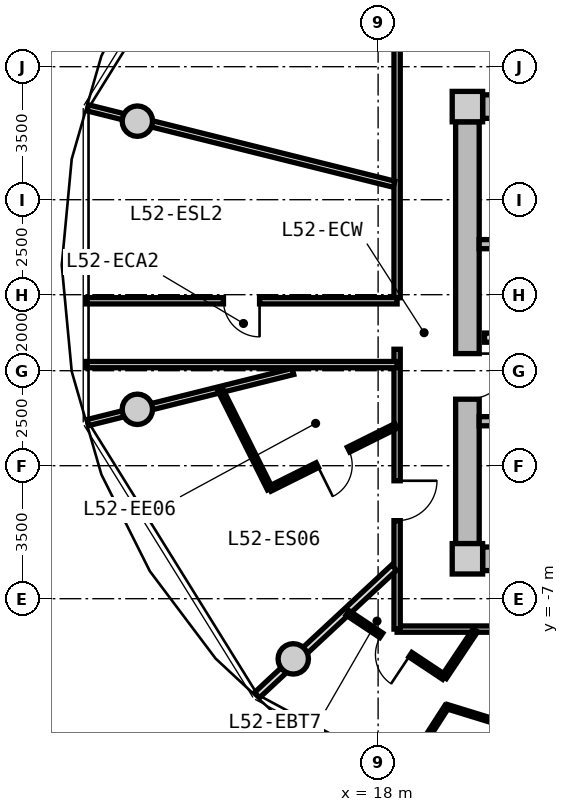
"""IFC4 building model, lengths in metres.
Left out: names, types, materials, properties, quantities, classifications, styles, units other than length and angle.
Written with IfcOpenShell. Run it as: python <this file> out.ifc"""

import sys

from ifc_helpers import new_model, si_unit, direction, frame, frame_2d, origin, origin_2d, place, context, subcontext, project, spatial, rectangle, circle, extrude, source, transform, mapped, element, fill, save


model = new_model("IFC4")
c1 = context("Model", 3, precision=1e-05, world=origin(), true_north=direction((0.0, 1.0)))
c2 = subcontext(c1, "Body", "Model", "MODEL_VIEW")
j1 = project(units=[si_unit("LENGTHUNIT", "METRE"), si_unit("PLANEANGLEUNIT", "RADIAN")], contexts=[c1])
p1 = place(None, origin())
s1 = spatial("IfcSite", under=j1, at=p1, CompositionType="ELEMENT")
p2 = place(p1, origin())
s2 = spatial("IfcBuilding", under=s1, at=p2, CompositionType="ELEMENT")
p3 = place(p2, frame((0.0, 0.0, 167.85)))
s3 = spatial("IfcBuildingStorey", under=s2, at=p3, CompositionType="ELEMENT", Elevation=167.85)
m1 = source(origin(), c2, "Body", "SweptSolid", [
    extrude(rectangle(XDim=0.8, YDim=0.8, at=origin_2d()), origin(), (0.0, 0.0, 1.0), 3.05),
])
for number, where, z_axis, x_axis in (
    (1, (20.35, -5.95, 0.0), (0.0, 0.0, 1.0), (1.0, 0.0, 0.0)),
    (2, (20.35, 5.95, 0.0), (0.0, 0.0, 1.0), (1.0, 0.0, 0.0)),
):
    element("IfcColumn", number, at=place(p3, frame(where, z_axis=z_axis, x_axis=x_axis)), inside=s3, PredefinedType="COLUMN", context=c2, shape_type="MappedRepresentation", body=[
        mapped(m1, transform((0.0, 0.0, 0.0), x_axis=(1.0, 0.0, 0.0), y_axis=(0.0, 1.0, 0.0), z_axis=(0.0, 0.0, 1.0), scale=1.0)),
    ])
m2 = source(origin(), c2, "Body", "SweptSolid", [
    extrude(rectangle(XDim=14.5, YDim=0.62, at=frame_2d((7.25, 0.0))), origin(), (0.0, 0.0, 1.0), 2.81),
])
for number, where, z_axis, x_axis in (
    (3, (20.75, 5.95, 0.0), (0.0, 0.0, 1.0), (1.0, 0.0, 0.0)),
    (4, (35.25, -5.95, 0.0), (0.0, 0.0, 1.0), (-1.0, 0.0, 0.0)),
):
    element("IfcWall", number, at=place(p3, frame(where, z_axis=z_axis, x_axis=x_axis)), inside=s3, PredefinedType="SHEAR", context=c2, shape_type="MappedRepresentation", body=[
        mapped(m2, transform((0.0, 0.0, 0.0), x_axis=(1.0, 0.0, 0.0), y_axis=(0.0, 1.0, 0.0), z_axis=(0.0, 0.0, 1.0), scale=1.0)),
    ])
m3 = source(origin(), c2, "Body", "SweptSolid", [
    extrude(rectangle(XDim=11.1, YDim=0.62, at=frame_2d((5.55, 0.0))), origin(), (0.0, 0.0, 1.0), 2.81),
])
p4 = place(p3, frame((20.35, -5.55, 0.0), z_axis=(0.0, 0.0, 1.0), x_axis=(0.0, 1.0, 0.0)))
e5 = element("IfcWall", 5, at=p4, inside=s3, PredefinedType="SHEAR", context=c2, shape_type="MappedRepresentation", body=[
    mapped(m3, transform((0.0, 0.0, 0.0), x_axis=(1.0, 0.0, 0.0), y_axis=(0.0, 1.0, 0.0), z_axis=(0.0, 0.0, 1.0), scale=1.0)),
])
p5 = place(p4, frame((3.8, 0.0, 0.0)))
e6 = element("IfcOpeningElement", 6, at=p5, cuts=e5, PredefinedType="OPENING", context=c2, shape_type="SweptSolid", body=[
    extrude(rectangle(XDim=1.2, YDim=2.15, at=frame_2d((0.6, 1.075))), frame((0.0, 0.32, 0.0), z_axis=(0.0, -1.0, 0.0), x_axis=(1.0, 0.0, 0.0)), (0.0, 0.0, 1.0), 0.64),
])
m4 = source(origin(), c2, "Body", "SweptSolid", [
    extrude(circle(Radius=0.4, at=origin_2d()), origin(), (0.0, 0.0, 1.0), 3.05),
])
for number, where, z_axis, x_axis in (
    (7, (11.665, 5.567, 0.0), (0.0, 0.0, 1.0), (1.0, 0.0, 0.0)),
    (8, (11.665, -2.016, 0.0), (0.0, 0.0, 1.0), (1.0, 0.0, 0.0)),
    (9, (15.767, -8.584, 0.0), (0.0, 0.0, 1.0), (1.0, 0.0, 0.0)),
):
    element("IfcColumn", number, at=place(p3, frame(where, z_axis=z_axis, x_axis=x_axis)), inside=s3, PredefinedType="COLUMN", context=c2, shape_type="MappedRepresentation", body=[
        mapped(m4, transform((0.0, 0.0, 0.0), x_axis=(1.0, 0.0, 0.0), y_axis=(0.0, 1.0, 0.0), z_axis=(0.0, 0.0, 1.0), scale=1.0)),
    ])
m5 = source(origin(), c2, "Body", "SweptSolid", [
    extrude(rectangle(XDim=7.88, YDim=0.24, at=frame_2d((3.94, 0.0))), origin(), (0.0, 0.0, 1.0), 2.81),
])
p6 = place(p3, frame((20.66, 2.33, 0.0), z_axis=(0.0, 0.0, 1.0), x_axis=(1.0, 0.0, 0.0)))
e10 = element("IfcWall", 10, at=p6, inside=s3, PredefinedType="PARTITIONING", context=c2, shape_type="MappedRepresentation", body=[
    mapped(m5, transform((0.0, 0.0, 0.0), x_axis=(1.0, 0.0, 0.0), y_axis=(0.0, 1.0, 0.0), z_axis=(0.0, 0.0, 1.0), scale=1.0)),
])
p7 = place(p3, frame((20.66, -2.33, 0.0), z_axis=(0.0, 0.0, 1.0), x_axis=(1.0, 0.0, 0.0)))
e11 = element("IfcWall", 11, at=p7, inside=s3, PredefinedType="PARTITIONING", context=c2, shape_type="MappedRepresentation", body=[
    mapped(m5, transform((0.0, 0.0, 0.0), x_axis=(1.0, 0.0, 0.0), y_axis=(0.0, 1.0, 0.0), z_axis=(0.0, 0.0, 1.0), scale=1.0)),
])
p8 = place(p7, frame((1.0, 0.0, 0.0)))
e12 = element("IfcOpeningElement", 12, at=p8, cuts=e11, PredefinedType="OPENING", context=c2, shape_type="SweptSolid", body=[
    extrude(rectangle(XDim=1.1, YDim=2.15, at=frame_2d((0.55, 1.075))), frame((0.0, 0.13, 0.0), z_axis=(0.0, -1.0, 0.0), x_axis=(1.0, 0.0, 0.0)), (0.0, 0.0, 1.0), 0.26),
])
m6 = source(origin(), c2, "Body", "SweptSolid", [
    extrude(rectangle(XDim=7.62, YDim=0.24, at=frame_2d((3.81, 0.0))), origin(), (0.0, 0.0, 1.0), 2.795),
])
p9 = place(p3, frame((20.8, -0.13, 0.0), z_axis=(0.0, 0.0, 1.0), x_axis=(1.0, 0.0, 0.0)))
e13 = element("IfcWall", 13, at=p9, inside=s3, PredefinedType="PARTITIONING", context=c2, shape_type="MappedRepresentation", body=[
    mapped(m6, transform((0.0, 0.0, 0.0), x_axis=(1.0, 0.0, 0.0), y_axis=(0.0, 1.0, 0.0), z_axis=(0.0, 0.0, 1.0), scale=1.0)),
])
p10 = place(p9, frame((6.22, 0.0, 0.0)))
e14 = element("IfcOpeningElement", 14, at=p10, cuts=e13, PredefinedType="OPENING", context=c2, shape_type="SweptSolid", body=[
    extrude(rectangle(XDim=1.0, YDim=2.1, at=frame_2d((0.5, 1.05))), frame((0.0, 0.13, 0.0), z_axis=(0.0, -1.0, 0.0), x_axis=(1.0, 0.0, 0.0)), (0.0, 0.0, 1.0), 0.26),
])
p11 = place(p9, frame((2.4, 0.0, 0.0)))
e15 = element("IfcOpeningElement", 15, at=p11, cuts=e13, PredefinedType="OPENING", context=c2, shape_type="SweptSolid", body=[
    extrude(rectangle(XDim=1.0, YDim=2.1, at=frame_2d((0.5, 1.05))), frame((0.0, 0.13, 0.0), z_axis=(0.0, -1.0, 0.0), x_axis=(1.0, 0.0, 0.0)), (0.0, 0.0, 1.0), 0.26),
])
m7 = source(origin(), c2, "Body", "SweptSolid", [
    extrude(rectangle(XDim=19.0, YDim=0.165, at=frame_2d((9.5, 0.0))), origin(), (0.0, 0.0, 1.0), 2.795),
])
p12 = place(p3, frame((37.5, -7.8, 0.0), z_axis=(0.0, 0.0, 1.0), x_axis=(-1.0, 0.0, 0.0)))
e16 = element("IfcWall", 16, at=p12, inside=s3, PredefinedType="PARTITIONING", context=c2, shape_type="MappedRepresentation", body=[
    mapped(m7, transform((0.0, 0.0, 0.0), x_axis=(1.0, 0.0, 0.0), y_axis=(0.0, 1.0, 0.0), z_axis=(0.0, 0.0, 1.0), scale=1.0)),
])
p13 = place(p12, frame((8.061, 0.0, 0.0)))
e17 = element("IfcOpeningElement", 17, at=p13, cuts=e16, PredefinedType="OPENING", context=c2, shape_type="SweptSolid", body=[
    extrude(rectangle(XDim=1.05, YDim=2.15, at=frame_2d((0.525, 1.075))), frame((0.0, 0.093, 0.0), z_axis=(0.0, -1.0, 0.0), x_axis=(1.0, 0.0, 0.0)), (0.0, 0.0, 1.0), 0.185),
])
m8 = source(origin(), c2, "Body", "SweptSolid", [
    extrude(rectangle(XDim=7.365, YDim=0.165, at=frame_2d((3.682, 0.0))), origin(), (0.0, 0.0, 1.0), 2.795),
])
p14 = place(p3, frame((18.5, -7.8, 0.0), z_axis=(0.0, 0.0, 1.0), x_axis=(0.0, 1.0, 0.0)))
e18 = element("IfcWall", 18, at=p14, inside=s3, PredefinedType="PARTITIONING", context=c2, shape_type="MappedRepresentation", body=[
    mapped(m8, transform((0.0, 0.0, 0.0), x_axis=(1.0, 0.0, 0.0), y_axis=(0.0, 1.0, 0.0), z_axis=(0.0, 0.0, 1.0), scale=1.0)),
])
p15 = place(p14, frame((2.854, 0.0, 0.0)))
e19 = element("IfcOpeningElement", 19, at=p15, cuts=e18, PredefinedType="OPENING", context=c2, shape_type="SweptSolid", body=[
    extrude(rectangle(XDim=1.05, YDim=2.15, at=frame_2d((0.525, 1.075))), frame((0.0, 0.093, 0.0), z_axis=(0.0, -1.0, 0.0), x_axis=(1.0, 0.0, 0.0)), (0.0, 0.0, 1.0), 0.185),
])
m9 = source(origin(), c2, "Body", "SweptSolid", [
    extrude(rectangle(XDim=6.88, YDim=0.165, at=frame_2d((3.44, 0.0))), origin(), (0.0, 0.0, 1.0), 2.795),
])
p16 = place(p3, frame((18.5, 0.92, 0.0), z_axis=(0.0, 0.0, 1.0), x_axis=(0.0, 1.0, 0.0)))
e20 = element("IfcWall", 20, at=p16, inside=s3, PredefinedType="PARTITIONING", context=c2, shape_type="MappedRepresentation", body=[
    mapped(m9, transform((0.0, 0.0, 0.0), x_axis=(1.0, 0.0, 0.0), y_axis=(0.0, 1.0, 0.0), z_axis=(0.0, 0.0, 1.0), scale=1.0)),
])
m10 = source(origin(), c2, "Body", "SweptSolid", [
    extrude(rectangle(XDim=8.305, YDim=0.165, at=frame_2d((4.153, 0.0))), origin(), (0.0, 0.0, 1.0), 2.345),
])
p17 = place(p3, frame((18.42, 3.908, 0.0), z_axis=(0.0, 0.0, 1.0), x_axis=(-0.970309994378, 0.241864662175, 0.0)))
e21 = element("IfcWall", 21, at=p17, inside=s3, PredefinedType="PARTITIONING", context=c2, shape_type="MappedRepresentation", body=[
    mapped(m10, transform((0.0, 0.0, 0.0), x_axis=(1.0, 0.0, 0.0), y_axis=(0.0, 1.0, 0.0), z_axis=(0.0, 0.0, 1.0), scale=1.0)),
])
m11 = source(origin(), c2, "Body", "SweptSolid", [
    extrude(rectangle(XDim=5.564, YDim=0.165, at=frame_2d((2.782, 0.0))), origin(), (0.0, 0.0, 1.0), 2.345),
])
p18 = place(p3, frame((15.76, -1.02, 0.0), z_axis=(0.0, 0.0, 1.0), x_axis=(-0.970315176167, -0.241843872984, 0.0)))
e22 = element("IfcWall", 22, at=p18, inside=s3, PredefinedType="PARTITIONING", context=c2, shape_type="MappedRepresentation", body=[
    mapped(m11, transform((0.0, 0.0, 0.0), x_axis=(1.0, 0.0, 0.0), y_axis=(0.0, 1.0, 0.0), z_axis=(0.0, 0.0, 1.0), scale=1.0)),
])
m12 = source(origin(), c2, "Body", "SweptSolid", [
    extrude(rectangle(XDim=8.189, YDim=0.165, at=frame_2d((4.094, 0.0))), origin(), (0.0, 0.0, 1.0), 2.795),
])
p19 = place(p3, frame((10.311, 0.84, 0.0), z_axis=(0.0, 0.0, 1.0), x_axis=(1.0, 0.0, 0.0)))
e23 = element("IfcWall", 23, at=p19, inside=s3, PredefinedType="PARTITIONING", context=c2, shape_type="MappedRepresentation", body=[
    mapped(m12, transform((0.0, 0.0, 0.0), x_axis=(1.0, 0.0, 0.0), y_axis=(0.0, 1.0, 0.0), z_axis=(0.0, 0.0, 1.0), scale=1.0)),
])
p20 = place(p19, frame((3.619, 0.0, 0.0)))
e24 = element("IfcOpeningElement", 24, at=p20, cuts=e23, PredefinedType="OPENING", context=c2, shape_type="SweptSolid", body=[
    extrude(rectangle(XDim=0.95, YDim=2.1, at=frame_2d((0.475, 1.05))), frame((0.0, 0.093, 0.0), z_axis=(0.0, -1.0, 0.0), x_axis=(1.0, 0.0, 0.0)), (0.0, 0.0, 1.0), 0.185),
])
p21 = place(p3, frame((18.5, -0.84, 0.0), z_axis=(0.0, 0.0, 1.0), x_axis=(-1.0, 0.0, 0.0)))
e25 = element("IfcWall", 25, at=p21, inside=s3, PredefinedType="PARTITIONING", context=c2, shape_type="MappedRepresentation", body=[
    mapped(m12, transform((0.0, 0.0, 0.0), x_axis=(1.0, 0.0, 0.0), y_axis=(0.0, 1.0, 0.0), z_axis=(0.0, 0.0, 1.0), scale=1.0)),
])
m13 = source(origin(), c2, "Body", "SweptSolid", [
    extrude(rectangle(XDim=4.927, YDim=0.19, at=frame_2d((2.463, 0.0))), origin(), (0.0, 0.0, 1.0), 2.345),
])
p22 = place(p3, frame((18.42, -6.183, 0.0), z_axis=(0.0, 0.0, 1.0), x_axis=(-0.732191335987, -0.681098999783, 0.0)))
e26 = element("IfcWall", 26, at=p22, inside=s3, PredefinedType="PARTITIONING", context=c2, shape_type="MappedRepresentation", body=[
    mapped(m13, transform((0.0, 0.0, 0.0), x_axis=(1.0, 0.0, 0.0), y_axis=(0.0, 1.0, 0.0), z_axis=(0.0, 0.0, 1.0), scale=1.0)),
])
m14 = source(origin(), c2, "Body", "SweptSolid", [
    extrude(rectangle(XDim=3.707, YDim=0.14, at=frame_2d((1.854, 0.0))), origin(), (0.0, 0.0, 1.0), 2.795),
])
p23 = place(p3, frame((18.47, -2.456, 0.0), z_axis=(0.0, 0.0, 1.0), x_axis=(-0.895347377717, -0.44536846904, 0.0)))
e27 = element("IfcWall", 27, at=p23, inside=s3, PredefinedType="PARTITIONING", context=c2, shape_type="MappedRepresentation", body=[
    mapped(m14, transform((0.0, 0.0, 0.0), x_axis=(1.0, 0.0, 0.0), y_axis=(0.0, 1.0, 0.0), z_axis=(0.0, 0.0, 1.0), scale=1.0)),
])
p24 = place(p23, frame((1.394, 0.0, 0.0)))
e28 = element("IfcOpeningElement", 28, at=p24, cuts=e27, PredefinedType="OPENING", context=c2, shape_type="SweptSolid", body=[
    extrude(rectangle(XDim=0.92, YDim=2.1, at=frame_2d((0.46, 1.05))), frame((0.0, 0.08, 0.0), z_axis=(0.0, -1.0, 0.0), x_axis=(1.0, 0.0, 0.0)), (0.0, 0.0, 1.0), 0.16),
])
m15 = source(origin(), c2, "Body", "SweptSolid", [
    extrude(rectangle(XDim=2.918, YDim=0.14, at=frame_2d((1.459, 0.0))), origin(), (0.0, 0.0, 1.0), 2.795),
])
p25 = place(p3, frame((15.151, -4.107, 0.0), z_axis=(0.0, 0.0, 1.0), x_axis=(-0.447146668647, 0.894460651296, 0.0)))
e29 = element("IfcWall", 29, at=p25, inside=s3, PredefinedType="PARTITIONING", context=c2, shape_type="MappedRepresentation", body=[
    mapped(m15, transform((0.0, 0.0, 0.0), x_axis=(1.0, 0.0, 0.0), y_axis=(0.0, 1.0, 0.0), z_axis=(0.0, 0.0, 1.0), scale=1.0)),
])
m16 = source(origin(), c2, "Body", "SweptSolid", [
    extrude(rectangle(XDim=1.482, YDim=0.14, at=frame_2d((0.741, 0.0))), origin(), (0.0, 0.0, 1.0), 2.795),
])
p26 = place(p3, frame((20.56, -7.83, 0.0), z_axis=(0.0, 0.0, 1.0), x_axis=(-0.555308105158, -0.831644700786, 0.0)))
e30 = element("IfcWall", 30, at=p26, inside=s3, PredefinedType="PARTITIONING", context=c2, shape_type="MappedRepresentation", body=[
    mapped(m16, transform((0.0, 0.0, 0.0), x_axis=(1.0, 0.0, 0.0), y_axis=(0.0, 1.0, 0.0), z_axis=(0.0, 0.0, 1.0), scale=1.0)),
])
m17 = source(origin(), c2, "Body", "SweptSolid", [
    extrude(rectangle(XDim=3.051, YDim=0.14, at=frame_2d((1.525, 0.0))), origin(), (0.0, 0.0, 1.0), 2.795),
])
p27 = place(p3, frame((19.737, -9.063, 0.0), z_axis=(0.0, 0.0, 1.0), x_axis=(-0.832763694299, 0.553628602456, 0.0)))
e31 = element("IfcWall", 31, at=p27, inside=s3, PredefinedType="PARTITIONING", context=c2, shape_type="MappedRepresentation", body=[
    mapped(m17, transform((0.0, 0.0, 0.0), x_axis=(1.0, 0.0, 0.0), y_axis=(0.0, 1.0, 0.0), z_axis=(0.0, 0.0, 1.0), scale=1.0)),
])
p28 = place(p27, frame((1.065, 0.0, 0.0)))
e32 = element("IfcOpeningElement", 32, at=p28, cuts=e31, PredefinedType="OPENING", context=c2, shape_type="SweptSolid", body=[
    extrude(rectangle(XDim=0.92, YDim=2.1, at=frame_2d((0.46, 1.05))), frame((0.0, 0.08, 0.0), z_axis=(0.0, -1.0, 0.0), x_axis=(1.0, 0.0, 0.0)), (0.0, 0.0, 1.0), 0.16),
])
m18 = source(origin(), c2, "Body", "SweptSolid", [
    extrude(rectangle(XDim=2.105, YDim=0.115, at=frame_2d((1.052, 0.0))), origin(), (0.0, 0.0, 1.0), 2.795),
])
p29 = place(p3, frame((19.808, -9.839, 0.0), z_axis=(0.0, 0.0, 1.0), x_axis=(-0.541542884204, -0.840673125875, 0.0)))
e33 = element("IfcWall", 33, at=p29, inside=s3, PredefinedType="PARTITIONING", context=c2, shape_type="MappedRepresentation", body=[
    mapped(m18, transform((0.0, 0.0, 0.0), x_axis=(1.0, 0.0, 0.0), y_axis=(0.0, 1.0, 0.0), z_axis=(0.0, 0.0, 1.0), scale=1.0)),
])
m19 = source(origin(), c2, "Body", "SweptSolid", [
    extrude(rectangle(XDim=3.693, YDim=0.115, at=frame_2d((1.847, 0.0))), origin(), (0.0, 0.0, 1.0), 2.795),
])
p30 = place(p3, frame((19.808, -9.839, 0.0), z_axis=(0.0, 0.0, 1.0), x_axis=(0.955691778506, -0.294369197599, 0.0)))
e34 = element("IfcWall", 34, at=p30, inside=s3, PredefinedType="PARTITIONING", context=c2, shape_type="MappedRepresentation", body=[
    mapped(m19, transform((0.0, 0.0, 0.0), x_axis=(1.0, 0.0, 0.0), y_axis=(0.0, 1.0, 0.0), z_axis=(0.0, 0.0, 1.0), scale=1.0)),
])
p31 = place(p30, frame((1.372, 0.0, 0.0)))
e35 = element("IfcOpeningElement", 35, at=p31, cuts=e34, PredefinedType="OPENING", context=c2, shape_type="SweptSolid", body=[
    extrude(rectangle(XDim=0.95, YDim=2.1, at=frame_2d((0.475, 1.05))), frame((0.0, 0.067, 0.0), z_axis=(0.0, -1.0, 0.0), x_axis=(1.0, 0.0, 0.0)), (0.0, 0.0, 1.0), 0.135),
])
m20 = source(origin(), c2, "Body", "SweptSolid", [
    extrude(rectangle(XDim=1.2, YDim=2.15, at=frame_2d((0.6, 1.075))), frame((0.0, 0.025, 0.0), z_axis=(0.0, -1.0, 0.0), x_axis=(1.0, 0.0, 0.0)), (0.0, 0.0, 1.0), 0.05),
])
p32 = place(p5, frame((1.2, 0.0, 0.0), z_axis=(0.0, 0.0, 1.0), x_axis=(-1.0, 0.0, 0.0)))
e36 = element("IfcDoor", 36, at=p32, inside=s3, OperationType="SINGLE_SWING_LEFT", PredefinedType="DOOR", context=c2, shape_type="MappedRepresentation", body=[
    mapped(m20, transform((0.0, 0.0, 0.0), x_axis=(1.0, 0.0, 0.0), y_axis=(0.0, 1.0, 0.0), z_axis=(0.0, 0.0, 1.0), scale=1.0)),
])
fill(e6, e36)
m21 = source(origin(), c2, "Body", "SweptSolid", [
    extrude(rectangle(XDim=0.95, YDim=2.1, at=frame_2d((0.475, 1.05))), frame((0.0, 0.025, 0.0), z_axis=(0.0, -1.0, 0.0), x_axis=(1.0, 0.0, 0.0)), (0.0, 0.0, 1.0), 0.05),
])
p33 = place(p20, frame((0.95, 0.0, 0.0), z_axis=(0.0, 0.0, 1.0), x_axis=(-1.0, 0.0, 0.0)))
e37 = element("IfcDoor", 37, at=p33, inside=s3, OperationType="SINGLE_SWING_LEFT", PredefinedType="DOOR", context=c2, shape_type="MappedRepresentation", body=[
    mapped(m21, transform((0.0, 0.0, 0.0), x_axis=(1.0, 0.0, 0.0), y_axis=(0.0, 1.0, 0.0), z_axis=(0.0, 0.0, 1.0), scale=1.0)),
])
fill(e24, e37)
m22 = source(origin(), c2, "Body", "SweptSolid", [
    extrude(rectangle(XDim=1.05, YDim=2.15, at=frame_2d((0.525, 1.075))), frame((0.0, 0.025, 0.0), z_axis=(0.0, -1.0, 0.0), x_axis=(1.0, 0.0, 0.0)), (0.0, 0.0, 1.0), 0.05),
])
p34 = place(p15, frame((1.05, 0.0, 0.0), z_axis=(0.0, 0.0, 1.0), x_axis=(-1.0, 0.0, 0.0)))
e38 = element("IfcDoor", 38, at=p34, inside=s3, OperationType="SINGLE_SWING_LEFT", PredefinedType="DOOR", context=c2, shape_type="MappedRepresentation", body=[
    mapped(m22, transform((0.0, 0.0, 0.0), x_axis=(1.0, 0.0, 0.0), y_axis=(0.0, 1.0, 0.0), z_axis=(0.0, 0.0, 1.0), scale=1.0)),
])
fill(e19, e38)
m23 = source(origin(), c2, "Body", "SweptSolid", [
    extrude(rectangle(XDim=0.92, YDim=2.1, at=frame_2d((0.46, 1.05))), frame((0.0, 0.025, 0.0), z_axis=(0.0, -1.0, 0.0), x_axis=(1.0, 0.0, 0.0)), (0.0, 0.0, 1.0), 0.05),
])
p35 = place(p24, origin())
e39 = element("IfcDoor", 39, at=p35, inside=s3, OperationType="SINGLE_SWING_RIGHT", PredefinedType="DOOR", context=c2, shape_type="MappedRepresentation", body=[
    mapped(m23, transform((0.0, 0.0, 0.0), x_axis=(1.0, 0.0, 0.0), y_axis=(0.0, 1.0, 0.0), z_axis=(0.0, 0.0, 1.0), scale=1.0)),
])
fill(e28, e39)
p36 = place(p28, origin())
e40 = element("IfcDoor", 40, at=p36, inside=s3, OperationType="SINGLE_SWING_LEFT", PredefinedType="DOOR", context=c2, shape_type="MappedRepresentation", body=[
    mapped(m23, transform((0.0, 0.0, 0.0), x_axis=(1.0, 0.0, 0.0), y_axis=(0.0, 1.0, 0.0), z_axis=(0.0, 0.0, 1.0), scale=1.0)),
])
fill(e32, e40)
save(model, sys.argv[1])
